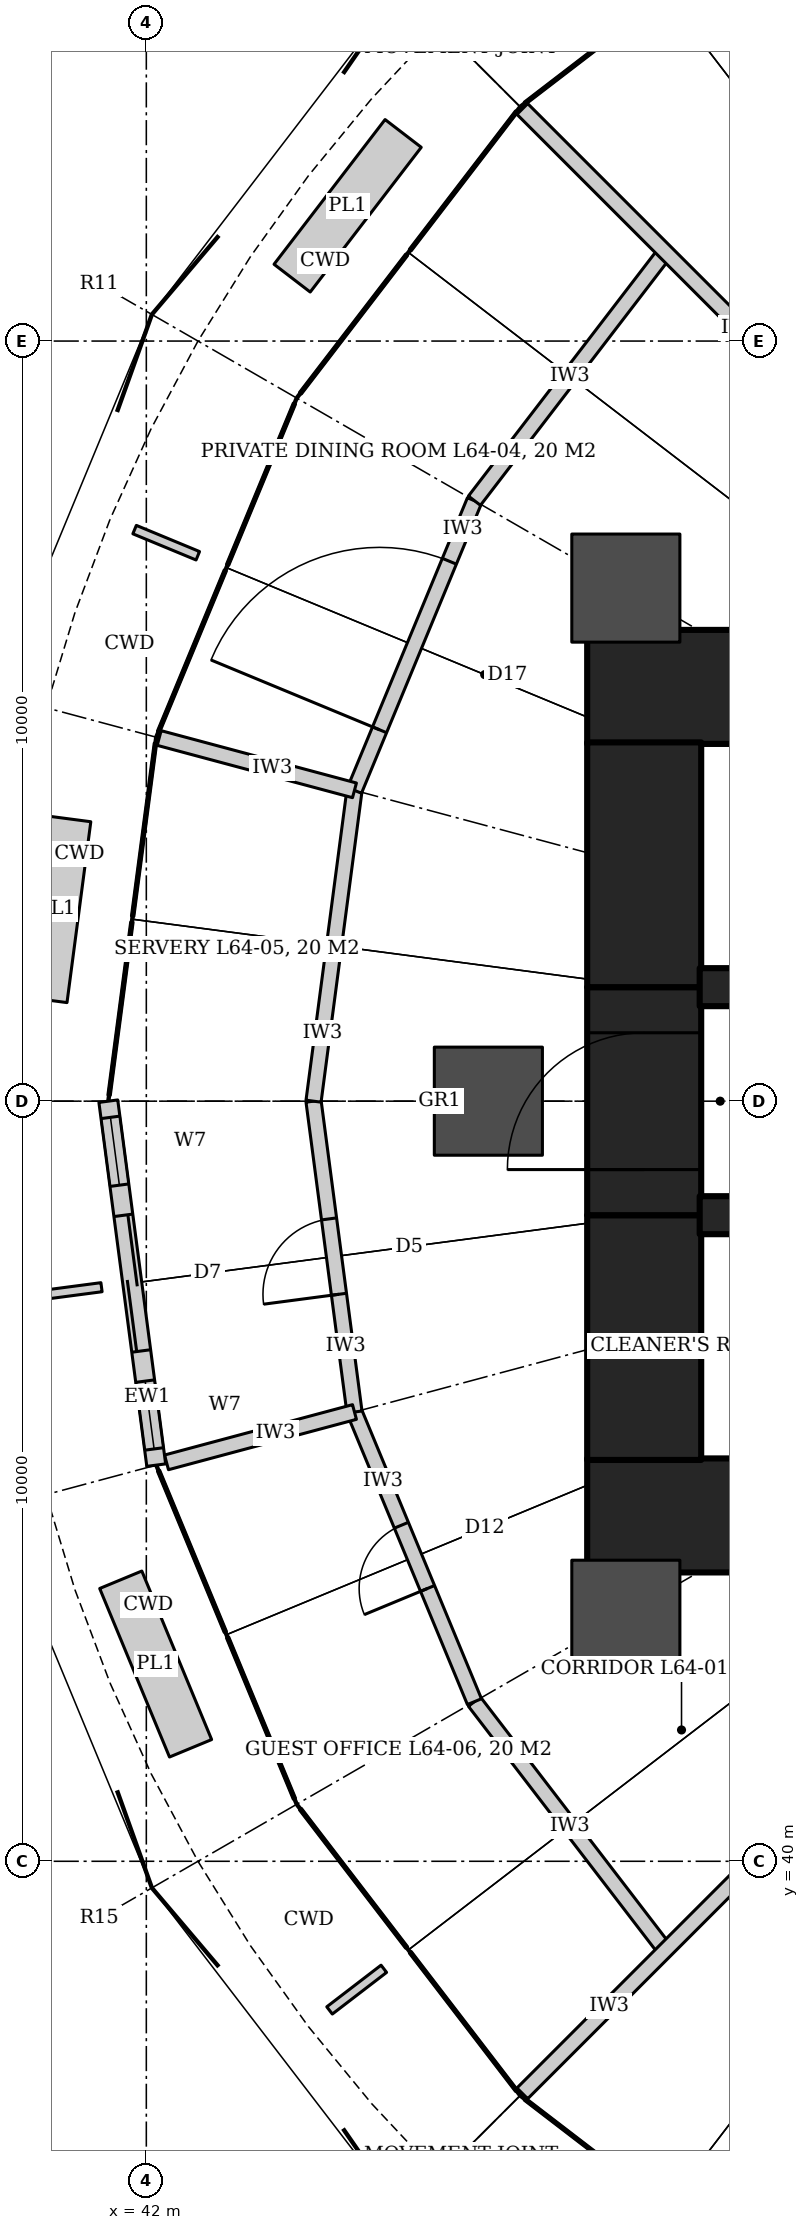
"""IFC4 building model, lengths in metres.
Left out: names, types, materials, properties, quantities, classifications, styles, units other than length and angle.
Written with IfcOpenShell. Run it as: python <this file> out.ifc"""

import sys

from ifc_helpers import new_model, si_unit, direction, frame, frame_2d, origin, origin_2d, place, context, subcontext, project, spatial, rectangle, hollow_circle, extrude, element, fill, save


model = new_model("IFC4")
c1 = context("Model", 3, precision=1e-05, world=origin(), true_north=direction((0.0, 1.0)))
c2 = subcontext(c1, "Body", "Model", "MODEL_VIEW")
j1 = project(units=[si_unit("LENGTHUNIT", "METRE"), si_unit("PLANEANGLEUNIT", "RADIAN")], contexts=[c1])
p1 = place(None, origin())
s1 = spatial("IfcSite", under=j1, at=p1, CompositionType="ELEMENT")
p2 = place(p1, origin())
s2 = spatial("IfcBuilding", under=s1, at=p2, CompositionType="ELEMENT")
p3 = place(p2, frame((0.0, 0.0, 278.0)))
s3 = spatial("IfcBuildingStorey", under=s2, at=p3, CompositionType="ELEMENT", Elevation=278.0)
for number, where, z_axis, x_axis in (
    (1, (47.8, 55.45, 0.0), (0.0, 0.0, 1.0), (1.0, 0.0, 0.0)),
    (2, (47.8, 44.55, 0.0), (0.0, 0.0, 1.0), (1.0, 0.0, 0.0)),
):
    element("IfcWall", number, at=place(p3, frame(where, z_axis=z_axis, x_axis=x_axis)), inside=s3, PredefinedType="SHEAR", context=c2, shape_type="SweptSolid", body=[
        extrude(rectangle(XDim=7.6, YDim=1.5, at=frame_2d((3.8, 0.0))), origin(), (0.0, 0.0, 1.0), 4.2),
    ])
p4 = place(p3, frame((48.55, 45.28, 0.0), z_axis=(0.0, 0.0, 1.0), x_axis=(0.0, 1.0, 0.0)))
e3 = element("IfcWall", 3, at=p4, inside=s3, PredefinedType="SHEAR", context=c2, shape_type="SweptSolid", body=[
    extrude(rectangle(XDim=3.22, YDim=1.5, at=frame_2d((1.61, 0.0))), origin(), (0.0, 0.0, 1.0), 4.2),
])
p5 = place(p3, frame((48.55, 48.5, 0.0), z_axis=(0.0, 0.0, 1.0), x_axis=(0.0, 1.0, 0.0)))
e4 = element("IfcWall", 4, at=p5, inside=s3, PredefinedType="SHEAR", context=c2, shape_type="SweptSolid", body=[
    extrude(rectangle(XDim=3.0, YDim=1.5, at=frame_2d((1.5, 0.0))), origin(), (0.0, 0.0, 1.0), 4.2),
])
p6 = place(p5, frame((0.6, 0.0, 0.0)))
e5 = element("IfcOpeningElement", 5, at=p6, cuts=e4, PredefinedType="OPENING", context=c2, shape_type="SweptSolid", body=[
    extrude(rectangle(XDim=1.8, YDim=2.1, at=frame_2d((0.9, 1.05))), frame((0.0, 0.76, 0.0), z_axis=(0.0, -1.0, 0.0), x_axis=(1.0, 0.0, 0.0)), (0.0, 0.0, 1.0), 1.52),
])
p7 = place(p3, frame((48.55, 51.5, 0.0), z_axis=(0.0, 0.0, 1.0), x_axis=(0.0, 1.0, 0.0)))
e6 = element("IfcWall", 6, at=p7, inside=s3, PredefinedType="SHEAR", context=c2, shape_type="SweptSolid", body=[
    extrude(rectangle(XDim=3.22, YDim=1.5, at=frame_2d((1.61, 0.0))), origin(), (0.0, 0.0, 1.0), 4.2),
])
p8 = place(p3, frame((49.28, 51.5, 0.0), z_axis=(0.0, 0.0, 1.0), x_axis=(1.0, 0.0, 0.0)))
e7 = element("IfcWall", 7, at=p8, inside=s3, PredefinedType="SHEAR", context=c2, shape_type="SweptSolid", body=[
    extrude(rectangle(XDim=6.12, YDim=0.5, at=frame_2d((3.06, 0.0))), origin(), (0.0, 0.0, 1.0), 4.2),
])
p9 = place(p8, frame((4.62, 0.0, 0.0)))
e8 = element("IfcOpeningElement", 8, at=p9, cuts=e7, PredefinedType="OPENING", context=c2, shape_type="SweptSolid", body=[
    extrude(rectangle(XDim=1.0, YDim=2.1, at=frame_2d((0.5, 1.05))), frame((0.0, 0.26, 0.0), z_axis=(0.0, -1.0, 0.0), x_axis=(1.0, 0.0, 0.0)), (0.0, 0.0, 1.0), 0.52),
])
p10 = place(p3, frame((49.28, 48.5, 0.0), z_axis=(0.0, 0.0, 1.0), x_axis=(1.0, 0.0, 0.0)))
e9 = element("IfcWall", 9, at=p10, inside=s3, PredefinedType="SHEAR", context=c2, shape_type="SweptSolid", body=[
    extrude(rectangle(XDim=6.12, YDim=0.5, at=frame_2d((3.06, 0.0))), origin(), (0.0, 0.0, 1.0), 4.2),
])
p11 = place(p10, frame((0.42, 0.0, 0.0)))
e10 = element("IfcOpeningElement", 10, at=p11, cuts=e9, PredefinedType="OPENING", context=c2, shape_type="SweptSolid", body=[
    extrude(rectangle(XDim=0.9, YDim=2.1, at=frame_2d((0.45, 1.05))), frame((0.0, 0.26, 0.0), z_axis=(0.0, -1.0, 0.0), x_axis=(1.0, 0.0, 0.0)), (0.0, 0.0, 1.0), 0.52),
])
p12 = place(p10, frame((2.27, 0.0, 0.0)))
e11 = element("IfcOpeningElement", 11, at=p12, cuts=e9, PredefinedType="OPENING", context=c2, shape_type="SweptSolid", body=[
    extrude(rectangle(XDim=1.0, YDim=2.1, at=frame_2d((0.5, 1.05))), frame((0.0, 0.26, 0.0), z_axis=(0.0, -1.0, 0.0), x_axis=(1.0, 0.0, 0.0)), (0.0, 0.0, 1.0), 0.52),
])
p13 = place(p10, frame((4.47, 0.0, 0.0)))
e12 = element("IfcOpeningElement", 12, at=p13, cuts=e9, PredefinedType="OPENING", context=c2, shape_type="SweptSolid", body=[
    extrude(rectangle(XDim=0.9, YDim=2.1, at=frame_2d((0.45, 1.05))), frame((0.0, 0.26, 0.0), z_axis=(0.0, -1.0, 0.0), x_axis=(1.0, 0.0, 0.0)), (0.0, 0.0, 1.0), 0.52),
])
for number, where, z_axis, x_axis in (
    (13, (48.309, 56.75, 0.0), (0.0, 0.0, 1.0), (1.0, 0.0, 0.0)),
    (14, (46.5, 50.0, 0.0), (0.0, 0.0, 1.0), (1.0, 0.0, 0.0)),
    (15, (48.309, 43.25, 0.0), (0.0, 0.0, 1.0), (1.0, 0.0, 0.0)),
):
    element("IfcColumn", number, at=place(p3, frame(where, z_axis=z_axis, x_axis=x_axis)), inside=s3, PredefinedType="COLUMN", context=c2, shape_type="SweptSolid", body=[
        extrude(hollow_circle(Radius=0.711, WallThickness=0.07, at=origin_2d()), origin(), (0.0, 0.0, 1.0), 4.2),
    ])
p14 = place(p3, frame((48.828, 38.828, 0.0), z_axis=(0.0, 0.0, 1.0), x_axis=(-0.608714823874, 0.793389099494, 0.0)))
e16 = element("IfcWall", 16, at=p14, inside=s3, PredefinedType="PARTITIONING", context=c2, shape_type="SweptSolid", body=[
    extrude(rectangle(XDim=4.125, YDim=0.2, at=frame_2d((2.062, 0.0))), origin(), (0.0, 0.0, 1.0), 3.02),
])
p15 = place(p3, frame((46.317, 42.1, 0.0), z_axis=(0.0, 0.0, 1.0), x_axis=(-0.382731667114, 0.923859551549, 0.0)))
e17 = element("IfcWall", 17, at=p15, inside=s3, PredefinedType="PARTITIONING", context=c2, shape_type="SweptSolid", body=[
    extrude(rectangle(XDim=4.125, YDim=0.2, at=frame_2d((2.062, 0.0))), origin(), (0.0, 0.0, 1.0), 3.02),
])
p16 = place(p15, frame((1.612, 0.0, 0.0)))
e18 = element("IfcOpeningElement", 18, at=p16, cuts=e17, PredefinedType="OPENING", context=c2, shape_type="SweptSolid", body=[
    extrude(rectangle(XDim=0.9, YDim=2.4, at=frame_2d((0.45, 1.2))), frame((0.0, 0.11, 0.0), z_axis=(0.0, -1.0, 0.0), x_axis=(1.0, 0.0, 0.0)), (0.0, 0.0, 1.0), 0.22),
])
p17 = place(p3, frame((44.738, 45.911, 0.0), z_axis=(0.0, 0.0, 1.0), x_axis=(-0.130515758099, 0.991446234996, 0.0)))
e19 = element("IfcWall", 19, at=p17, inside=s3, PredefinedType="PARTITIONING", context=c2, shape_type="SweptSolid", body=[
    extrude(rectangle(XDim=4.125, YDim=0.2, at=frame_2d((2.062, 0.0))), origin(), (0.0, 0.0, 1.0), 3.02),
])
p18 = place(p17, frame((1.562, 0.0, 0.0)))
e20 = element("IfcOpeningElement", 20, at=p18, cuts=e19, PredefinedType="OPENING", context=c2, shape_type="SweptSolid", body=[
    extrude(rectangle(XDim=1.0, YDim=2.1, at=frame_2d((0.5, 1.05))), frame((0.0, 0.11, 0.0), z_axis=(0.0, -1.0, 0.0), x_axis=(1.0, 0.0, 0.0)), (0.0, 0.0, 1.0), 0.22),
])
p19 = place(p3, frame((44.2, 50.0, 0.0), z_axis=(0.0, 0.0, 1.0), x_axis=(0.130515758099, 0.991446234996, 0.0)))
e21 = element("IfcWall", 21, at=p19, inside=s3, PredefinedType="PARTITIONING", context=c2, shape_type="SweptSolid", body=[
    extrude(rectangle(XDim=4.125, YDim=0.2, at=frame_2d((2.062, 0.0))), origin(), (0.0, 0.0, 1.0), 3.02),
])
p20 = place(p3, frame((44.738, 54.089, 0.0), z_axis=(0.0, 0.0, 1.0), x_axis=(0.382731667114, 0.923859551549, 0.0)))
e22 = element("IfcWall", 22, at=p20, inside=s3, PredefinedType="PARTITIONING", context=c2, shape_type="SweptSolid", body=[
    extrude(rectangle(XDim=4.125, YDim=0.2, at=frame_2d((2.062, 0.0))), origin(), (0.0, 0.0, 1.0), 3.02),
])
p21 = place(p20, frame((0.862, 0.0, 0.0)))
e23 = element("IfcOpeningElement", 23, at=p21, cuts=e22, PredefinedType="OPENING", context=c2, shape_type="SweptSolid", body=[
    extrude(rectangle(XDim=2.4, YDim=2.4, at=frame_2d((1.2, 1.2))), frame((0.0, 0.11, 0.0), z_axis=(0.0, -1.0, 0.0), x_axis=(1.0, 0.0, 0.0)), (0.0, 0.0, 1.0), 0.22),
])
p22 = place(p3, frame((46.317, 57.9, 0.0), z_axis=(0.0, 0.0, 1.0), x_axis=(0.608714823874, 0.793389099494, 0.0)))
e24 = element("IfcWall", 24, at=p22, inside=s3, PredefinedType="PARTITIONING", context=c2, shape_type="SweptSolid", body=[
    extrude(rectangle(XDim=4.125, YDim=0.2, at=frame_2d((2.062, 0.0))), origin(), (0.0, 0.0, 1.0), 3.02),
])
p23 = place(p3, frame((53.8, 56.2, 0.0), z_axis=(0.0, 0.0, 1.0), x_axis=(-0.707106781187, 0.707106781187, 0.0)))
e25 = element("IfcWall", 25, at=p23, inside=s3, PredefinedType="PARTITIONING", context=c2, shape_type="SweptSolid", body=[
    extrude(rectangle(XDim=9.692, YDim=0.2, at=frame_2d((4.846, 0.0))), origin(), (0.0, 0.0, 1.0), 3.02),
])
p24 = place(p3, frame((44.738, 54.089, 0.0), z_axis=(0.0, 0.0, 1.0), x_axis=(-0.965923469749, 0.25882783967, 0.0)))
e26 = element("IfcWall", 26, at=p24, inside=s3, PredefinedType="PARTITIONING", context=c2, shape_type="SweptSolid", body=[
    extrude(rectangle(XDim=2.66, YDim=0.2, at=frame_2d((1.33, 0.0))), origin(), (0.0, 0.0, 1.0), 3.02),
])
p25 = place(p3, frame((44.738, 45.911, 0.0), z_axis=(0.0, 0.0, 1.0), x_axis=(-0.965920805306, -0.258837782939, 0.0)))
e27 = element("IfcWall", 27, at=p25, inside=s3, PredefinedType="PARTITIONING", context=c2, shape_type="SweptSolid", body=[
    extrude(rectangle(XDim=2.56, YDim=0.2, at=frame_2d((1.28, 0.0))), origin(), (0.0, 0.0, 1.0), 3.02),
])
p26 = place(p3, frame((53.8, 43.8, 0.0), z_axis=(0.0, 0.0, 1.0), x_axis=(-0.707106781187, -0.707106781187, 0.0)))
e28 = element("IfcWall", 28, at=p26, inside=s3, PredefinedType="PARTITIONING", context=c2, shape_type="SweptSolid", body=[
    extrude(rectangle(XDim=9.692, YDim=0.2, at=frame_2d((4.846, 0.0))), origin(), (0.0, 0.0, 1.0), 3.02),
])
p27 = place(p26, frame((2.316, 0.0, 0.0)))
e29 = element("IfcOpeningElement", 29, at=p27, cuts=e28, PredefinedType="OPENING", context=c2, shape_type="SweptSolid", body=[
    extrude(rectangle(XDim=2.4, YDim=2.4, at=frame_2d((1.2, 1.2))), frame((0.0, 0.11, 0.0), z_axis=(0.0, -1.0, 0.0), x_axis=(1.0, 0.0, 0.0)), (0.0, 0.0, 1.0), 0.22),
])
p28 = place(p3, frame((41.5, 50.0, 0.0), z_axis=(0.0, 0.0, 1.0), x_axis=(0.130527743461, -0.991444657148, 0.0)))
e30 = element("IfcWall", 30, at=p28, inside=s3, PredefinedType="SOLIDWALL", context=c2, shape_type="SweptSolid", body=[
    extrude(rectangle(XDim=4.829, YDim=0.25, at=frame_2d((2.415, 0.0))), origin(), (0.0, 0.0, 1.0), 4.04),
])
p29 = place(p28, frame((1.515, 0.0, 0.0)))
e31 = element("IfcOpeningElement", 31, at=p29, cuts=e30, PredefinedType="OPENING", context=c2, shape_type="SweptSolid", body=[
    extrude(rectangle(XDim=1.8, YDim=2.4, at=frame_2d((0.9, 1.2))), frame((0.0, 0.135, 0.0), z_axis=(0.0, -1.0, 0.0), x_axis=(1.0, 0.0, 0.0)), (0.0, 0.0, 1.0), 0.27),
])
p30 = place(p28, frame((0.215, 0.0, 0.0)))
e32 = element("IfcOpeningElement", 32, at=p30, cuts=e30, PredefinedType="OPENING", context=c2, shape_type="SweptSolid", body=[
    extrude(rectangle(XDim=0.9, YDim=2.4, at=frame_2d((0.45, 1.2))), frame((0.0, 0.135, 0.0), z_axis=(0.0, -1.0, 0.0), x_axis=(1.0, 0.0, 0.0)), (0.0, 0.0, 1.0), 0.27),
])
p31 = place(p28, frame((3.715, 0.0, 0.0)))
e33 = element("IfcOpeningElement", 33, at=p31, cuts=e30, PredefinedType="OPENING", context=c2, shape_type="SweptSolid", body=[
    extrude(rectangle(XDim=0.9, YDim=2.4, at=frame_2d((0.45, 1.2))), frame((0.0, 0.135, 0.0), z_axis=(0.0, -1.0, 0.0), x_axis=(1.0, 0.0, 0.0)), (0.0, 0.0, 1.0), 0.27),
])
p32 = place(p21, origin())
e34 = element("IfcDoor", 34, at=p32, inside=s3, OperationType="DOUBLE_DOOR_DOUBLE_SWING", PredefinedType="DOOR", context=c2, shape_type="SweptSolid", body=[
    extrude(rectangle(XDim=2.4, YDim=2.4, at=frame_2d((1.2, 1.2))), frame((0.0, 0.025, 0.0), z_axis=(0.0, -1.0, 0.0), x_axis=(1.0, 0.0, 0.0)), (0.0, 0.0, 1.0), 0.05),
])
fill(e23, e34)
p33 = place(p18, origin())
e35 = element("IfcDoor", 35, at=p33, inside=s3, OperationType="SINGLE_SWING_LEFT", PredefinedType="DOOR", context=c2, shape_type="SweptSolid", body=[
    extrude(rectangle(XDim=1.0, YDim=2.1, at=frame_2d((0.5, 1.05))), frame((0.0, 0.025, 0.0), z_axis=(0.0, -1.0, 0.0), x_axis=(1.0, 0.0, 0.0)), (0.0, 0.0, 1.0), 0.05),
])
fill(e20, e35)
p34 = place(p16, origin())
e36 = element("IfcDoor", 36, at=p34, inside=s3, OperationType="SINGLE_SWING_LEFT", PredefinedType="DOOR", context=c2, shape_type="SweptSolid", body=[
    extrude(rectangle(XDim=0.9, YDim=2.4, at=frame_2d((0.45, 1.2))), frame((0.0, 0.025, 0.0), z_axis=(0.0, -1.0, 0.0), x_axis=(1.0, 0.0, 0.0)), (0.0, 0.0, 1.0), 0.05),
])
fill(e18, e36)
p35 = place(p29, origin())
e37 = element("IfcDoor", 37, at=p35, inside=s3, OperationType="DOUBLE_DOOR_SLIDING", PredefinedType="DOOR", context=c2, shape_type="SweptSolid", body=[
    extrude(rectangle(XDim=1.8, YDim=2.4, at=frame_2d((0.9, 1.2))), frame((0.0, 0.025, 0.0), z_axis=(0.0, -1.0, 0.0), x_axis=(1.0, 0.0, 0.0)), (0.0, 0.0, 1.0), 0.05),
])
fill(e31, e37)
p36 = place(p30, origin())
e38 = element("IfcWindow", 38, at=p36, inside=s3, PartitioningType="SINGLE_PANEL", PredefinedType="WINDOW", context=c2, shape_type="SweptSolid", body=[
    extrude(rectangle(XDim=0.9, YDim=2.4, at=frame_2d((0.45, 1.2))), frame((0.0, 0.03, 0.0), z_axis=(0.0, -1.0, 0.0), x_axis=(1.0, 0.0, 0.0)), (0.0, 0.0, 1.0), 0.06),
])
fill(e32, e38)
p37 = place(p31, origin())
e39 = element("IfcWindow", 39, at=p37, inside=s3, PartitioningType="SINGLE_PANEL", PredefinedType="WINDOW", context=c2, shape_type="SweptSolid", body=[
    extrude(rectangle(XDim=0.9, YDim=2.4, at=frame_2d((0.45, 1.2))), frame((0.0, 0.03, 0.0), z_axis=(0.0, -1.0, 0.0), x_axis=(1.0, 0.0, 0.0)), (0.0, 0.0, 1.0), 0.06),
])
fill(e33, e39)
p38 = place(p6, origin())
e40 = element("IfcDoor", 40, at=p38, inside=s3, OperationType="DOUBLE_DOOR_DOUBLE_SWING", PredefinedType="DOOR", context=c2, shape_type="SweptSolid", body=[
    extrude(rectangle(XDim=1.8, YDim=2.1, at=frame_2d((0.9, 1.05))), frame((0.0, 0.025, 0.0), z_axis=(0.0, -1.0, 0.0), x_axis=(1.0, 0.0, 0.0)), (0.0, 0.0, 1.0), 0.05),
])
fill(e5, e40)
save(model, sys.argv[1])
